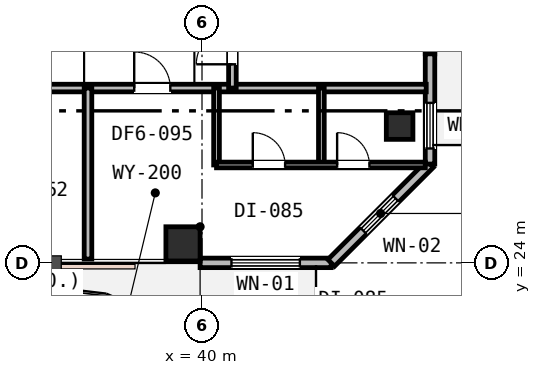
"""IFC4 building model, lengths in metres.
Left out: names, types, materials, properties, quantities, classifications, styles, units other than length and angle.
Written with IfcOpenShell. Run it as: python <this file> out.ifc"""

import sys

from ifc_helpers import new_model, si_unit, direction, frame, frame_2d, origin, origin_2d, place, context, subcontext, project, spatial, rectangle, extrude, element, fill, save


model = new_model("IFC4")
c1 = context("Model", 3, precision=1e-05, world=origin(), true_north=direction((0.0, 1.0)))
c2 = subcontext(c1, "Body", "Model", "MODEL_VIEW")
j1 = project(units=[si_unit("LENGTHUNIT", "METRE"), si_unit("PLANEANGLEUNIT", "RADIAN")], contexts=[c1])
p1 = place(None, origin())
s1 = spatial("IfcSite", under=j1, at=p1, CompositionType="ELEMENT")
p2 = place(p1, origin())
s2 = spatial("IfcBuilding", under=s1, at=p2, CompositionType="ELEMENT")
p3 = place(p2, frame((0.0, 0.0, 275.4)))
s3 = spatial("IfcBuildingStorey", under=s2, at=p3, CompositionType="ELEMENT", Elevation=275.4)
p4 = place(p3, frame((39.5, 24.5, 0.0), z_axis=(0.0, 0.0, 1.0), x_axis=(1.0, 0.0, 0.0)))
e1 = element("IfcColumn", 1, at=p4, inside=s3, PredefinedType="COLUMN", context=c2, shape_type="SweptSolid", body=[
    extrude(rectangle(XDim=0.9, YDim=0.9, at=origin_2d()), origin(), (0.0, 0.0, 1.0), 3.8),
])
p5 = place(p3, frame((45.2, 27.6, 0.0), z_axis=(0.0, 0.0, 1.0), x_axis=(1.0, 0.0, 0.0)))
e2 = element("IfcColumn", 2, at=p5, inside=s3, PredefinedType="COLUMN", context=c2, shape_type="SweptSolid", body=[
    extrude(rectangle(XDim=0.7, YDim=0.7, at=origin_2d()), origin(), (0.0, 0.0, 1.0), 3.8),
])
p6 = place(p3, frame((39.95, 24.0, 0.0), z_axis=(0.0, 0.0, 1.0), x_axis=(1.0, 0.0, 0.0)))
e3 = element("IfcWall", 3, at=p6, inside=s3, PredefinedType="STANDARD", context=c2, shape_type="SweptSolid", body=[
    extrude(rectangle(XDim=3.45, YDim=0.25, at=frame_2d((1.725, 0.0))), origin(), (0.0, 0.0, 1.0), 3.53),
])
p7 = place(p6, frame((0.825, 0.0, 0.75)))
e4 = element("IfcOpeningElement", 4, at=p7, cuts=e3, PredefinedType="OPENING", context=c2, shape_type="SweptSolid", body=[
    extrude(rectangle(XDim=1.8, YDim=1.85, at=frame_2d((0.9, 0.925))), frame((0.0, 0.135, 0.0), z_axis=(0.0, -1.0, 0.0), x_axis=(1.0, 0.0, 0.0)), (0.0, 0.0, 1.0), 0.27),
])
p8 = place(p3, frame((43.4, 24.0, 0.0), z_axis=(0.0, 0.0, 1.0), x_axis=(0.707106781187, 0.707106781187, 0.0)))
e5 = element("IfcWall", 5, at=p8, inside=s3, PredefinedType="STANDARD", context=c2, shape_type="SweptSolid", body=[
    extrude(rectangle(XDim=3.677, YDim=0.25, at=frame_2d((1.839, 0.0))), origin(), (0.0, 0.0, 1.0), 3.53),
])
p9 = place(p8, frame((1.196, 0.0, 0.85)))
e6 = element("IfcOpeningElement", 6, at=p9, cuts=e5, PredefinedType="OPENING", context=c2, shape_type="SweptSolid", body=[
    extrude(rectangle(XDim=1.2, YDim=1.6, at=frame_2d((0.6, 0.8))), frame((0.0, 0.135, 0.0), z_axis=(0.0, -1.0, 0.0), x_axis=(1.0, 0.0, 0.0)), (0.0, 0.0, 1.0), 0.27),
])
p10 = place(p3, frame((46.0, 29.5, 0.0), z_axis=(0.0, 0.0, 1.0), x_axis=(0.0, 1.0, 0.0)))
e7 = element("IfcWall", 7, at=p10, inside=s3, PredefinedType="STANDARD", context=c2, shape_type="SweptSolid", body=[
    extrude(rectangle(XDim=2.0, YDim=0.25, at=frame_2d((1.0, 0.0))), origin(), (0.0, 0.0, 1.0), 3.53),
])
p11 = place(p10, frame((0.5, 0.0, 0.0)))
e8 = element("IfcOpeningElement", 8, at=p11, cuts=e7, PredefinedType="OPENING", context=c2, shape_type="SweptSolid", body=[
    extrude(rectangle(XDim=1.0, YDim=2.15, at=frame_2d((0.5, 1.075))), frame((0.0, 0.135, 0.0), z_axis=(0.0, -1.0, 0.0), x_axis=(1.0, 0.0, 0.0)), (0.0, 0.0, 1.0), 0.27),
])
p12 = place(p3, frame((46.0, 26.6, 0.0), z_axis=(0.0, 0.0, 1.0), x_axis=(0.0, 1.0, 0.0)))
e9 = element("IfcWall", 9, at=p12, inside=s3, PredefinedType="STANDARD", context=c2, shape_type="SweptSolid", body=[
    extrude(rectangle(XDim=2.9, YDim=0.25, at=frame_2d((1.45, 0.0))), origin(), (0.0, 0.0, 1.0), 3.53),
])
p13 = place(p12, frame((0.41, 0.0, 0.85)))
e10 = element("IfcOpeningElement", 10, at=p13, cuts=e9, PredefinedType="OPENING", context=c2, shape_type="SweptSolid", body=[
    extrude(rectangle(XDim=1.2, YDim=1.6, at=frame_2d((0.6, 0.8))), frame((0.0, 0.135, 0.0), z_axis=(0.0, -1.0, 0.0), x_axis=(1.0, 0.0, 0.0)), (0.0, 0.0, 1.0), 0.27),
])
p14 = place(p3, frame((14.2, 28.6, 0.0), z_axis=(0.0, 0.0, 1.0), x_axis=(1.0, 0.0, 0.0)))
e11 = element("IfcWall", 11, at=p14, inside=s3, PredefinedType="PARTITIONING", context=c2, shape_type="SweptSolid", body=[
    extrude(rectangle(XDim=31.7, YDim=0.2, at=frame_2d((15.85, 0.0))), origin(), (0.0, 0.0, 1.0), 3.16),
])
p15 = place(p14, frame((12.625, 0.0, 0.0)))
e12 = element("IfcOpeningElement", 12, at=p15, cuts=e11, PredefinedType="OPENING", context=c2, shape_type="SweptSolid", body=[
    extrude(rectangle(XDim=0.95, YDim=2.15, at=frame_2d((0.475, 1.075))), frame((0.0, 0.11, 0.0), z_axis=(0.0, -1.0, 0.0), x_axis=(1.0, 0.0, 0.0)), (0.0, 0.0, 1.0), 0.22),
])
p16 = place(p14, frame((19.125, 0.0, 0.0)))
e13 = element("IfcOpeningElement", 13, at=p16, cuts=e11, PredefinedType="OPENING", context=c2, shape_type="SweptSolid", body=[
    extrude(rectangle(XDim=0.95, YDim=2.15, at=frame_2d((0.475, 1.075))), frame((0.0, 0.11, 0.0), z_axis=(0.0, -1.0, 0.0), x_axis=(1.0, 0.0, 0.0)), (0.0, 0.0, 1.0), 0.22),
])
p17 = place(p14, frame((24.016, 0.0, 0.0)))
e14 = element("IfcOpeningElement", 14, at=p17, cuts=e11, PredefinedType="OPENING", context=c2, shape_type="SweptSolid", body=[
    extrude(rectangle(XDim=0.95, YDim=2.15, at=frame_2d((0.475, 1.075))), frame((0.0, 0.11, 0.0), z_axis=(0.0, -1.0, 0.0), x_axis=(1.0, 0.0, 0.0)), (0.0, 0.0, 1.0), 0.22),
])
p18 = place(p3, frame((40.8, 28.6, 0.0), z_axis=(0.0, 0.0, 1.0), x_axis=(0.0, 1.0, 0.0)))
e15 = element("IfcWall", 15, at=p18, inside=s3, PredefinedType="PARTITIONING", context=c2, shape_type="SweptSolid", body=[
    extrude(rectangle(XDim=14.3, YDim=0.2, at=frame_2d((7.15, 0.0))), origin(), (0.0, 0.0, 1.0), 3.16),
])
p19 = place(p18, frame((0.625, 0.0, 0.0)))
e16 = element("IfcOpeningElement", 16, at=p19, cuts=e15, PredefinedType="OPENING", context=c2, shape_type="SweptSolid", body=[
    extrude(rectangle(XDim=0.95, YDim=2.15, at=frame_2d((0.475, 1.075))), frame((0.0, 0.11, 0.0), z_axis=(0.0, -1.0, 0.0), x_axis=(1.0, 0.0, 0.0)), (0.0, 0.0, 1.0), 0.22),
])
p20 = place(p3, frame((37.0, 24.1, 0.0), z_axis=(0.0, 0.0, 1.0), x_axis=(0.0, 1.0, 0.0)))
e17 = element("IfcWall", 17, at=p20, inside=s3, PredefinedType="PARTITIONING", context=c2, shape_type="SweptSolid", body=[
    extrude(rectangle(XDim=4.5, YDim=0.2, at=frame_2d((2.25, 0.0))), origin(), (0.0, 0.0, 1.0), 3.27),
])
for number, where, z_axis, x_axis in (
    (18, (40.382, 26.576, 0.0), (0.0, 0.0, 1.0), (0.0, 1.0, 0.0)),
    (19, (43.141, 26.576, 0.0), (0.0, 0.0, 1.0), (0.0, 1.0, 0.0)),
):
    element("IfcWall", number, at=place(p3, frame(where, z_axis=z_axis, x_axis=x_axis)), inside=s3, PredefinedType="PARTITIONING", context=c2, shape_type="SweptSolid", body=[
        extrude(rectangle(XDim=2.024, YDim=0.15, at=frame_2d((1.012, 0.0))), origin(), (0.0, 0.0, 1.0), 3.53),
    ])
p21 = place(p3, frame((40.382, 26.576, 0.0), z_axis=(0.0, 0.0, 1.0), x_axis=(1.0, 0.0, 0.0)))
e20 = element("IfcWall", 20, at=p21, inside=s3, PredefinedType="PARTITIONING", context=c2, shape_type="SweptSolid", body=[
    extrude(rectangle(XDim=5.494, YDim=0.15, at=frame_2d((2.747, 0.0))), origin(), (0.0, 0.0, 1.0), 3.53),
])
p22 = place(p21, frame((0.955, 0.0, 0.0)))
e21 = element("IfcOpeningElement", 21, at=p22, cuts=e20, PredefinedType="OPENING", context=c2, shape_type="SweptSolid", body=[
    extrude(rectangle(XDim=0.85, YDim=2.15, at=frame_2d((0.425, 1.075))), frame((0.0, 0.085, 0.0), z_axis=(0.0, -1.0, 0.0), x_axis=(1.0, 0.0, 0.0)), (0.0, 0.0, 1.0), 0.17),
])
p23 = place(p21, frame((3.174, 0.0, 0.0)))
e22 = element("IfcOpeningElement", 22, at=p23, cuts=e20, PredefinedType="OPENING", context=c2, shape_type="SweptSolid", body=[
    extrude(rectangle(XDim=0.85, YDim=2.15, at=frame_2d((0.425, 1.075))), frame((0.0, 0.085, 0.0), z_axis=(0.0, -1.0, 0.0), x_axis=(1.0, 0.0, 0.0)), (0.0, 0.0, 1.0), 0.17),
])
p24 = place(p7, origin())
e23 = element("IfcWindow", 23, at=p24, inside=s3, PartitioningType="SINGLE_PANEL", PredefinedType="WINDOW", context=c2, shape_type="SweptSolid", body=[
    extrude(rectangle(XDim=1.8, YDim=1.85, at=frame_2d((0.9, 0.925))), frame((0.0, 0.03, 0.0), z_axis=(0.0, -1.0, 0.0), x_axis=(1.0, 0.0, 0.0)), (0.0, 0.0, 1.0), 0.06),
])
fill(e4, e23)
p25 = place(p9, origin())
e24 = element("IfcWindow", 24, at=p25, inside=s3, PartitioningType="SINGLE_PANEL", PredefinedType="WINDOW", context=c2, shape_type="SweptSolid", body=[
    extrude(rectangle(XDim=1.2, YDim=1.6, at=frame_2d((0.6, 0.8))), frame((0.0, 0.03, 0.0), z_axis=(0.0, -1.0, 0.0), x_axis=(1.0, 0.0, 0.0)), (0.0, 0.0, 1.0), 0.06),
])
fill(e6, e24)
p26 = place(p13, origin())
e25 = element("IfcWindow", 25, at=p26, inside=s3, PartitioningType="SINGLE_PANEL", PredefinedType="WINDOW", context=c2, shape_type="SweptSolid", body=[
    extrude(rectangle(XDim=1.2, YDim=1.6, at=frame_2d((0.6, 0.8))), frame((0.0, 0.03, 0.0), z_axis=(0.0, -1.0, 0.0), x_axis=(1.0, 0.0, 0.0)), (0.0, 0.0, 1.0), 0.06),
])
fill(e10, e25)
p27 = place(p19, origin())
e26 = element("IfcDoor", 26, at=p27, inside=s3, OperationType="SINGLE_SWING_LEFT", PredefinedType="DOOR", context=c2, shape_type="SweptSolid", body=[
    extrude(rectangle(XDim=0.95, YDim=2.15, at=frame_2d((0.475, 1.075))), frame((0.0, 0.025, 0.0), z_axis=(0.0, -1.0, 0.0), x_axis=(1.0, 0.0, 0.0)), (0.0, 0.0, 1.0), 0.05),
])
fill(e16, e26)
p28 = place(p17, origin())
e27 = element("IfcDoor", 27, at=p28, inside=s3, OperationType="SINGLE_SWING_LEFT", PredefinedType="DOOR", context=c2, shape_type="SweptSolid", body=[
    extrude(rectangle(XDim=0.95, YDim=2.15, at=frame_2d((0.475, 1.075))), frame((0.0, 0.025, 0.0), z_axis=(0.0, -1.0, 0.0), x_axis=(1.0, 0.0, 0.0)), (0.0, 0.0, 1.0), 0.05),
])
fill(e14, e27)
p29 = place(p22, origin())
e28 = element("IfcDoor", 28, at=p29, inside=s3, OperationType="SINGLE_SWING_LEFT", PredefinedType="DOOR", context=c2, shape_type="SweptSolid", body=[
    extrude(rectangle(XDim=0.85, YDim=2.15, at=frame_2d((0.425, 1.075))), frame((0.0, 0.025, 0.0), z_axis=(0.0, -1.0, 0.0), x_axis=(1.0, 0.0, 0.0)), (0.0, 0.0, 1.0), 0.05),
])
fill(e21, e28)
p30 = place(p23, origin())
e29 = element("IfcDoor", 29, at=p30, inside=s3, OperationType="SINGLE_SWING_LEFT", PredefinedType="DOOR", context=c2, shape_type="SweptSolid", body=[
    extrude(rectangle(XDim=0.85, YDim=2.15, at=frame_2d((0.425, 1.075))), frame((0.0, 0.025, 0.0), z_axis=(0.0, -1.0, 0.0), x_axis=(1.0, 0.0, 0.0)), (0.0, 0.0, 1.0), 0.05),
])
fill(e22, e29)
save(model, sys.argv[1])
